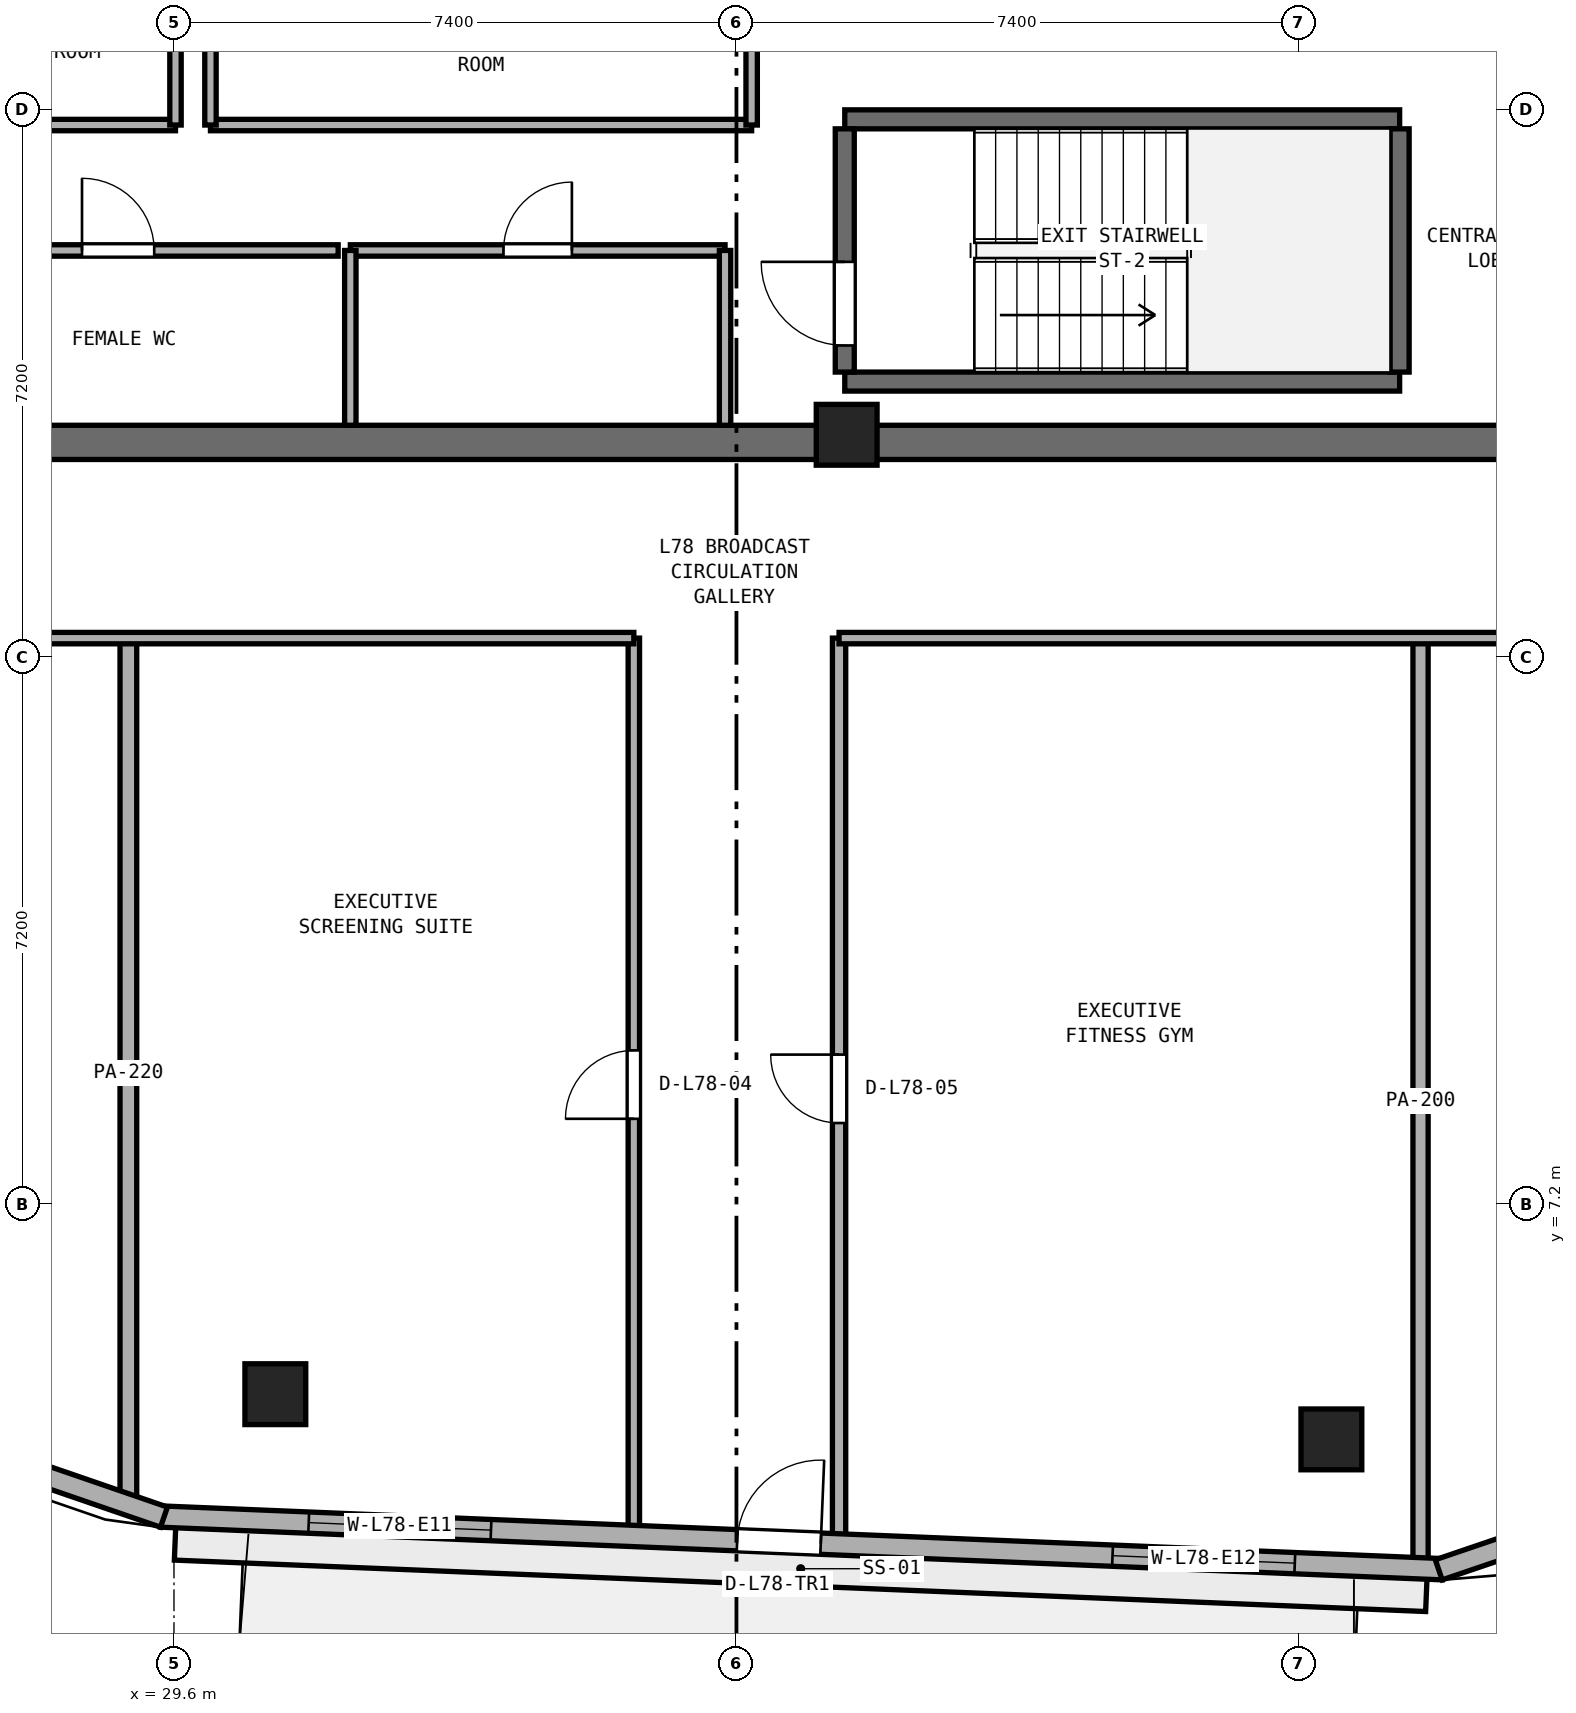
"""IFC4 building model, lengths in metres.
Left out: names, types, materials, properties, quantities, classifications, styles, units other than length and angle.
Written with IfcOpenShell. Run it as: python <this file> out.ifc"""

import sys

from ifc_helpers import new_model, si_unit, direction, frame, frame_2d, origin, origin_2d, place, context, subcontext, project, spatial, rectangle, extrude, element, fill, save


model = new_model("IFC4")
c1 = context("Model", 3, precision=1e-05, world=origin(), true_north=direction((0.0, 1.0)))
c2 = subcontext(c1, "Body", "Model", "MODEL_VIEW")
j1 = project(units=[si_unit("LENGTHUNIT", "METRE"), si_unit("PLANEANGLEUNIT", "RADIAN")], contexts=[c1])
p1 = place(None, origin())
s1 = spatial("IfcSite", under=j1, at=p1, CompositionType="ELEMENT")
p2 = place(p1, origin())
s2 = spatial("IfcBuilding", under=s1, at=p2, CompositionType="ELEMENT")
p3 = place(p2, frame((0.0, 0.0, 304.8)))
s3 = spatial("IfcBuildingStorey", under=s2, at=p3, CompositionType="ELEMENT", Elevation=304.8)
p4 = place(p3, frame((25.4, 17.225, 0.0), z_axis=(0.0, 0.0, 1.0), x_axis=(1.0, 0.0, 0.0)))
e1 = element("IfcWall", 1, at=p4, inside=s3, PredefinedType="SHEAR", context=c2, shape_type="SweptSolid", body=[
    extrude(rectangle(XDim=23.2, YDim=0.45, at=frame_2d((11.6, 0.0))), origin(), (0.0, 0.0, 1.0), 3.4),
])
p5 = place(p3, frame((38.45, 17.325, 0.0), z_axis=(0.0, 0.0, 1.0), x_axis=(1.0, 0.0, 0.0)))
e2 = element("IfcColumn", 2, at=p5, inside=s3, PredefinedType="PILASTER", context=c2, shape_type="SweptSolid", body=[
    extrude(rectangle(XDim=0.8, YDim=0.8, at=origin_2d()), origin(), (0.0, 0.0, 1.0), 3.8),
])
for number, where, z_axis, x_axis in (
    (3, (30.934, 4.703, 0.0), (0.0, 0.0, 1.0), (1.0, 0.0, 0.0)),
    (4, (44.827, 4.108, 0.0), (0.0, 0.0, 1.0), (1.0, 0.0, 0.0)),
):
    element("IfcColumn", number, at=place(p3, frame(where, z_axis=z_axis, x_axis=x_axis)), inside=s3, PredefinedType="COLUMN", context=c2, shape_type="SweptSolid", body=[
        extrude(rectangle(XDim=0.8, YDim=0.8, at=origin_2d()), origin(), (0.0, 0.0, 1.0), 3.8),
    ])
for number, where, z_axis, x_axis in (
    (5, (38.425, 18.025, 0.0), (0.0, 0.0, 1.0), (1.0, 0.0, 0.0)),
    (6, (38.425, 21.475, 0.0), (0.0, 0.0, 1.0), (1.0, 0.0, 0.0)),
):
    element("IfcWall", number, at=place(p3, frame(where, z_axis=z_axis, x_axis=x_axis)), inside=s3, PredefinedType="SHEAR", context=c2, shape_type="SweptSolid", body=[
        extrude(rectangle(XDim=7.3, YDim=0.25, at=frame_2d((3.65, 0.0))), origin(), (0.0, 0.0, 1.0), 3.4),
    ])
p6 = place(p3, frame((38.425, 18.15, 0.0), z_axis=(0.0, 0.0, 1.0), x_axis=(0.0, 1.0, 0.0)))
e7 = element("IfcWall", 7, at=p6, inside=s3, PredefinedType="SHEAR", context=c2, shape_type="SweptSolid", body=[
    extrude(rectangle(XDim=3.2, YDim=0.25, at=frame_2d((1.6, 0.0))), origin(), (0.0, 0.0, 1.0), 3.4),
])
p7 = place(p6, frame((0.35, 0.0, 0.0)))
e8 = element("IfcOpeningElement", 8, at=p7, cuts=e7, PredefinedType="OPENING", context=c2, shape_type="SweptSolid", body=[
    extrude(rectangle(XDim=1.1, YDim=2.15, at=frame_2d((0.55, 1.075))), frame((0.0, 0.135, 0.0), z_axis=(0.0, -1.0, 0.0), x_axis=(1.0, 0.0, 0.0)), (0.0, 0.0, 1.0), 0.27),
])
p8 = place(p3, frame((45.725, 18.15, 0.0), z_axis=(0.0, 0.0, 1.0), x_axis=(0.0, 1.0, 0.0)))
e9 = element("IfcWall", 9, at=p8, inside=s3, PredefinedType="SHEAR", context=c2, shape_type="SweptSolid", body=[
    extrude(rectangle(XDim=3.2, YDim=0.25, at=frame_2d((1.6, 0.0))), origin(), (0.0, 0.0, 1.0), 3.4),
])
p9 = place(p3, frame((25.97, 19.75, 0.0), z_axis=(0.0, 0.0, 1.0), x_axis=(1.0, 0.0, 0.0)))
e10 = element("IfcWall", 10, at=p9, inside=s3, PredefinedType="PARTITIONING", context=c2, shape_type="SweptSolid", body=[
    extrude(rectangle(XDim=5.79, YDim=0.15, at=frame_2d((2.895, 0.0))), origin(), (0.0, 0.0, 1.0), 3.4),
])
p10 = place(p9, frame((2.42, 0.0, 0.0)))
e11 = element("IfcOpeningElement", 11, at=p10, cuts=e10, PredefinedType="OPENING", context=c2, shape_type="SweptSolid", body=[
    extrude(rectangle(XDim=0.95, YDim=2.1, at=frame_2d((0.475, 1.05))), frame((0.0, 0.085, 0.0), z_axis=(0.0, -1.0, 0.0), x_axis=(1.0, 0.0, 0.0)), (0.0, 0.0, 1.0), 0.17),
])
p11 = place(p3, frame((31.92, 19.75, 0.0), z_axis=(0.0, 0.0, 1.0), x_axis=(1.0, 0.0, 0.0)))
e12 = element("IfcWall", 12, at=p11, inside=s3, PredefinedType="PARTITIONING", context=c2, shape_type="SweptSolid", body=[
    extrude(rectangle(XDim=4.93, YDim=0.15, at=frame_2d((2.465, 0.0))), origin(), (0.0, 0.0, 1.0), 3.4),
])
p12 = place(p11, frame((2.015, 0.0, 0.0)))
e13 = element("IfcOpeningElement", 13, at=p12, cuts=e12, PredefinedType="OPENING", context=c2, shape_type="SweptSolid", body=[
    extrude(rectangle(XDim=0.9, YDim=2.1, at=frame_2d((0.45, 1.05))), frame((0.0, 0.085, 0.0), z_axis=(0.0, -1.0, 0.0), x_axis=(1.0, 0.0, 0.0)), (0.0, 0.0, 1.0), 0.17),
])
for number, where, z_axis, x_axis in (
    (14, (31.92, 17.45, 0.0), (0.0, 0.0, 1.0), (0.0, 1.0, 0.0)),
    (15, (36.85, 17.45, 0.0), (0.0, 0.0, 1.0), (0.0, 1.0, 0.0)),
):
    element("IfcWall", number, at=place(p3, frame(where, z_axis=z_axis, x_axis=x_axis)), inside=s3, PredefinedType="PARTITIONING", context=c2, shape_type="SweptSolid", body=[
        extrude(rectangle(XDim=2.3, YDim=0.15, at=frame_2d((1.15, 0.0))), origin(), (0.0, 0.0, 1.0), 3.4),
    ])
p13 = place(p3, frame((25.97, 21.4, 0.0), z_axis=(0.0, 0.0, 1.0), x_axis=(1.0, 0.0, 0.0)))
e16 = element("IfcWall", 16, at=p13, inside=s3, PredefinedType="PARTITIONING", context=c2, shape_type="SweptSolid", body=[
    extrude(rectangle(XDim=3.65, YDim=0.15, at=frame_2d((1.825, 0.0))), origin(), (0.0, 0.0, 1.0), 3.4),
])
p14 = place(p3, frame((29.62, 21.4, 0.0), z_axis=(0.0, 0.0, 1.0), x_axis=(0.0, 1.0, 0.0)))
e17 = element("IfcWall", 17, at=p14, inside=s3, PredefinedType="PARTITIONING", context=c2, shape_type="SweptSolid", body=[
    extrude(rectangle(XDim=2.2, YDim=0.15, at=frame_2d((1.1, 0.0))), origin(), (0.0, 0.0, 1.0), 3.4),
])
p15 = place(p3, frame((30.08, 21.4, 0.0), z_axis=(0.0, 0.0, 1.0), x_axis=(1.0, 0.0, 0.0)))
e18 = element("IfcWall", 18, at=p15, inside=s3, PredefinedType="PARTITIONING", context=c2, shape_type="SweptSolid", body=[
    extrude(rectangle(XDim=7.12, YDim=0.15, at=frame_2d((3.56, 0.0))), origin(), (0.0, 0.0, 1.0), 3.4),
])
for number, where, z_axis, x_axis in (
    (19, (30.08, 21.4, 0.0), (0.0, 0.0, 1.0), (0.0, 1.0, 0.0)),
    (20, (37.2, 21.4, 0.0), (0.0, 0.0, 1.0), (0.0, 1.0, 0.0)),
):
    element("IfcWall", number, at=place(p3, frame(where, z_axis=z_axis, x_axis=x_axis)), inside=s3, PredefinedType="PARTITIONING", context=c2, shape_type="SweptSolid", body=[
        extrude(rectangle(XDim=2.2, YDim=0.15, at=frame_2d((1.1, 0.0))), origin(), (0.0, 0.0, 1.0), 3.4),
    ])
p16 = place(p3, frame((46.0, 2.477, 0.0), z_axis=(0.0, 0.0, 1.0), x_axis=(0.0, 1.0, 0.0)))
e21 = element("IfcWall", 21, at=p16, inside=s3, PredefinedType="PARTITIONING", context=c2, shape_type="SweptSolid", body=[
    extrude(rectangle(XDim=12.173, YDim=0.2, at=frame_2d((6.086, 0.0))), origin(), (0.0, 0.0, 1.0), 3.4),
])
p17 = place(p3, frame((38.35, 2.792, 0.0), z_axis=(0.0, 0.0, 1.0), x_axis=(0.0, 1.0, 0.0)))
e22 = element("IfcWall", 22, at=p17, inside=s3, PredefinedType="PARTITIONING", context=c2, shape_type="SweptSolid", body=[
    extrude(rectangle(XDim=11.858, YDim=0.175, at=frame_2d((5.929, 0.0))), origin(), (0.0, 0.0, 1.0), 3.4),
])
p18 = place(p17, frame((5.479, 0.0, 0.0)))
e23 = element("IfcOpeningElement", 23, at=p18, cuts=e22, PredefinedType="OPENING", context=c2, shape_type="SweptSolid", body=[
    extrude(rectangle(XDim=0.9, YDim=2.1, at=frame_2d((0.45, 1.05))), frame((0.0, 0.097, 0.0), z_axis=(0.0, -1.0, 0.0), x_axis=(1.0, 0.0, 0.0)), (0.0, 0.0, 1.0), 0.195),
])
p19 = place(p3, frame((35.65, 2.902, 0.0), z_axis=(0.0, 0.0, 1.0), x_axis=(0.0, 1.0, 0.0)))
e24 = element("IfcWall", 24, at=p19, inside=s3, PredefinedType="PARTITIONING", context=c2, shape_type="SweptSolid", body=[
    extrude(rectangle(XDim=11.748, YDim=0.15, at=frame_2d((5.874, 0.0))), origin(), (0.0, 0.0, 1.0), 3.4),
])
p20 = place(p19, frame((5.424, 0.0, 0.0)))
e25 = element("IfcOpeningElement", 25, at=p20, cuts=e24, PredefinedType="OPENING", context=c2, shape_type="SweptSolid", body=[
    extrude(rectangle(XDim=0.9, YDim=2.1, at=frame_2d((0.45, 1.05))), frame((0.0, 0.085, 0.0), z_axis=(0.0, -1.0, 0.0), x_axis=(1.0, 0.0, 0.0)), (0.0, 0.0, 1.0), 0.17),
])
p21 = place(p3, frame((29.0, 3.217, 0.0), z_axis=(0.0, 0.0, 1.0), x_axis=(0.0, 1.0, 0.0)))
e26 = element("IfcWall", 26, at=p21, inside=s3, PredefinedType="PARTITIONING", context=c2, shape_type="SweptSolid", body=[
    extrude(rectangle(XDim=11.433, YDim=0.22, at=frame_2d((5.716, 0.0))), origin(), (0.0, 0.0, 1.0), 3.4),
])
p22 = place(p3, frame((23.05, 14.65, 0.0), z_axis=(0.0, 0.0, 1.0), x_axis=(1.0, 0.0, 0.0)))
e27 = element("IfcWall", 27, at=p22, inside=s3, PredefinedType="PARTITIONING", context=c2, shape_type="SweptSolid", body=[
    extrude(rectangle(XDim=12.6, YDim=0.15, at=frame_2d((6.3, 0.0))), origin(), (0.0, 0.0, 1.0), 3.4),
])
p23 = place(p22, frame((2.645, 0.0, 0.0)))
e28 = element("IfcOpeningElement", 28, at=p23, cuts=e27, PredefinedType="OPENING", context=c2, shape_type="SweptSolid", body=[
    extrude(rectangle(XDim=0.9, YDim=2.1, at=frame_2d((0.45, 1.05))), frame((0.0, 0.085, 0.0), z_axis=(0.0, -1.0, 0.0), x_axis=(1.0, 0.0, 0.0)), (0.0, 0.0, 1.0), 0.17),
])
p24 = place(p3, frame((38.35, 14.65, 0.0), z_axis=(0.0, 0.0, 1.0), x_axis=(1.0, 0.0, 0.0)))
e29 = element("IfcWall", 29, at=p24, inside=s3, PredefinedType="PARTITIONING", context=c2, shape_type="SweptSolid", body=[
    extrude(rectangle(XDim=12.6, YDim=0.15, at=frame_2d((6.3, 0.0))), origin(), (0.0, 0.0, 1.0), 3.4),
])
p25 = place(p24, frame((9.555, 0.0, 0.0)))
e30 = element("IfcOpeningElement", 30, at=p25, cuts=e29, PredefinedType="OPENING", context=c2, shape_type="SweptSolid", body=[
    extrude(rectangle(XDim=0.9, YDim=2.1, at=frame_2d((0.45, 1.05))), frame((0.0, 0.085, 0.0), z_axis=(0.0, -1.0, 0.0), x_axis=(1.0, 0.0, 0.0)), (0.0, 0.0, 1.0), 0.17),
])
p26 = place(p3, frame((29.428, 3.093, 0.0), z_axis=(0.0, 0.0, 1.0), x_axis=(0.999156257967, -0.041070331944, 0.0)))
e31 = element("IfcWall", 31, at=p26, inside=s3, PredefinedType="STANDARD", context=c2, shape_type="SweptSolid", body=[
    extrude(rectangle(XDim=16.876, YDim=0.28, at=frame_2d((8.438, 0.0))), origin(), (0.0, 0.0, 1.0), 3.4),
])
p27 = place(p26, frame((7.588, 0.0, 0.0)))
e32 = element("IfcOpeningElement", 32, at=p27, cuts=e31, PredefinedType="OPENING", context=c2, shape_type="SweptSolid", body=[
    extrude(rectangle(XDim=1.1, YDim=2.2, at=frame_2d((0.55, 1.1))), frame((0.0, 0.15, 0.0), z_axis=(0.0, -1.0, 0.0), x_axis=(1.0, 0.0, 0.0)), (0.0, 0.0, 1.0), 0.3),
])
p28 = place(p26, frame((1.946, 0.0, 0.9)))
e33 = element("IfcOpeningElement", 33, at=p28, cuts=e31, PredefinedType="OPENING", context=c2, shape_type="SweptSolid", body=[
    extrude(rectangle(XDim=2.4, YDim=1.75, at=frame_2d((1.2, 0.875))), frame((0.0, 0.15, 0.0), z_axis=(0.0, -1.0, 0.0), x_axis=(1.0, 0.0, 0.0)), (0.0, 0.0, 1.0), 0.3),
])
p29 = place(p26, frame((12.53, 0.0, 0.9)))
e34 = element("IfcOpeningElement", 34, at=p29, cuts=e31, PredefinedType="OPENING", context=c2, shape_type="SweptSolid", body=[
    extrude(rectangle(XDim=2.4, YDim=1.75, at=frame_2d((1.2, 0.875))), frame((0.0, 0.15, 0.0), z_axis=(0.0, -1.0, 0.0), x_axis=(1.0, 0.0, 0.0)), (0.0, 0.0, 1.0), 0.3),
])
p30 = place(p3, frame((46.24, 2.393, 0.0), z_axis=(0.0, 0.0, 1.0), x_axis=(0.946759165502, 0.321942669643, 0.0)))
e35 = element("IfcWall", 35, at=p30, inside=s3, PredefinedType="STANDARD", context=c2, shape_type="SweptSolid", body=[
    extrude(rectangle(XDim=2.74, YDim=0.28, at=frame_2d((1.37, 0.0))), origin(), (0.0, 0.0, 1.0), 3.4),
])
p31 = place(p3, frame((27.411, 3.794, 0.0), z_axis=(0.0, 0.0, 1.0), x_axis=(0.945552869008, -0.325468542121, 0.0)))
e36 = element("IfcWall", 36, at=p31, inside=s3, PredefinedType="STANDARD", context=c2, shape_type="SweptSolid", body=[
    extrude(rectangle(XDim=2.176, YDim=0.28, at=frame_2d((1.088, 0.0))), origin(), (0.0, 0.0, 1.0), 3.4),
])
p32 = place(p7, origin())
e37 = element("IfcDoor", 37, at=p32, inside=s3, OperationType="SINGLE_SWING_RIGHT", PredefinedType="DOOR", context=c2, shape_type="SweptSolid", body=[
    extrude(rectangle(XDim=1.1, YDim=2.15, at=frame_2d((0.55, 1.075))), frame((0.0, 0.025, 0.0), z_axis=(0.0, -1.0, 0.0), x_axis=(1.0, 0.0, 0.0)), (0.0, 0.0, 1.0), 0.05),
])
fill(e8, e37)
p33 = place(p10, origin())
e38 = element("IfcDoor", 38, at=p33, inside=s3, OperationType="SINGLE_SWING_LEFT", PredefinedType="DOOR", context=c2, shape_type="SweptSolid", body=[
    extrude(rectangle(XDim=0.95, YDim=2.1, at=frame_2d((0.475, 1.05))), frame((0.0, 0.025, 0.0), z_axis=(0.0, -1.0, 0.0), x_axis=(1.0, 0.0, 0.0)), (0.0, 0.0, 1.0), 0.05),
])
fill(e11, e38)
p34 = place(p12, origin())
e39 = element("IfcDoor", 39, at=p34, inside=s3, OperationType="SINGLE_SWING_RIGHT", PredefinedType="DOOR", context=c2, shape_type="SweptSolid", body=[
    extrude(rectangle(XDim=0.9, YDim=2.1, at=frame_2d((0.45, 1.05))), frame((0.0, 0.025, 0.0), z_axis=(0.0, -1.0, 0.0), x_axis=(1.0, 0.0, 0.0)), (0.0, 0.0, 1.0), 0.05),
])
fill(e13, e39)
p35 = place(p20, origin())
e40 = element("IfcDoor", 40, at=p35, inside=s3, OperationType="SINGLE_SWING_LEFT", PredefinedType="DOOR", context=c2, shape_type="SweptSolid", body=[
    extrude(rectangle(XDim=0.9, YDim=2.1, at=frame_2d((0.45, 1.05))), frame((0.0, 0.025, 0.0), z_axis=(0.0, -1.0, 0.0), x_axis=(1.0, 0.0, 0.0)), (0.0, 0.0, 1.0), 0.05),
])
fill(e25, e40)
p36 = place(p18, origin())
e41 = element("IfcDoor", 41, at=p36, inside=s3, OperationType="SINGLE_SWING_RIGHT", PredefinedType="DOOR", context=c2, shape_type="SweptSolid", body=[
    extrude(rectangle(XDim=0.9, YDim=2.1, at=frame_2d((0.45, 1.05))), frame((0.0, 0.025, 0.0), z_axis=(0.0, -1.0, 0.0), x_axis=(1.0, 0.0, 0.0)), (0.0, 0.0, 1.0), 0.05),
])
fill(e23, e41)
p37 = place(p27, origin())
e42 = element("IfcDoor", 42, at=p37, inside=s3, OperationType="SINGLE_SWING_RIGHT", PredefinedType="DOOR", context=c2, shape_type="SweptSolid", body=[
    extrude(rectangle(XDim=1.1, YDim=2.2, at=frame_2d((0.55, 1.1))), frame((0.0, 0.025, 0.0), z_axis=(0.0, -1.0, 0.0), x_axis=(1.0, 0.0, 0.0)), (0.0, 0.0, 1.0), 0.05),
])
fill(e32, e42)
p38 = place(p28, origin())
e43 = element("IfcWindow", 43, at=p38, inside=s3, PartitioningType="SINGLE_PANEL", PredefinedType="WINDOW", context=c2, shape_type="SweptSolid", body=[
    extrude(rectangle(XDim=2.4, YDim=1.75, at=frame_2d((1.2, 0.875))), frame((0.0, 0.03, 0.0), z_axis=(0.0, -1.0, 0.0), x_axis=(1.0, 0.0, 0.0)), (0.0, 0.0, 1.0), 0.06),
])
fill(e33, e43)
p39 = place(p29, origin())
e44 = element("IfcWindow", 44, at=p39, inside=s3, PartitioningType="SINGLE_PANEL", PredefinedType="WINDOW", context=c2, shape_type="SweptSolid", body=[
    extrude(rectangle(XDim=2.4, YDim=1.75, at=frame_2d((1.2, 0.875))), frame((0.0, 0.03, 0.0), z_axis=(0.0, -1.0, 0.0), x_axis=(1.0, 0.0, 0.0)), (0.0, 0.0, 1.0), 0.06),
])
fill(e34, e44)
save(model, sys.argv[1])
